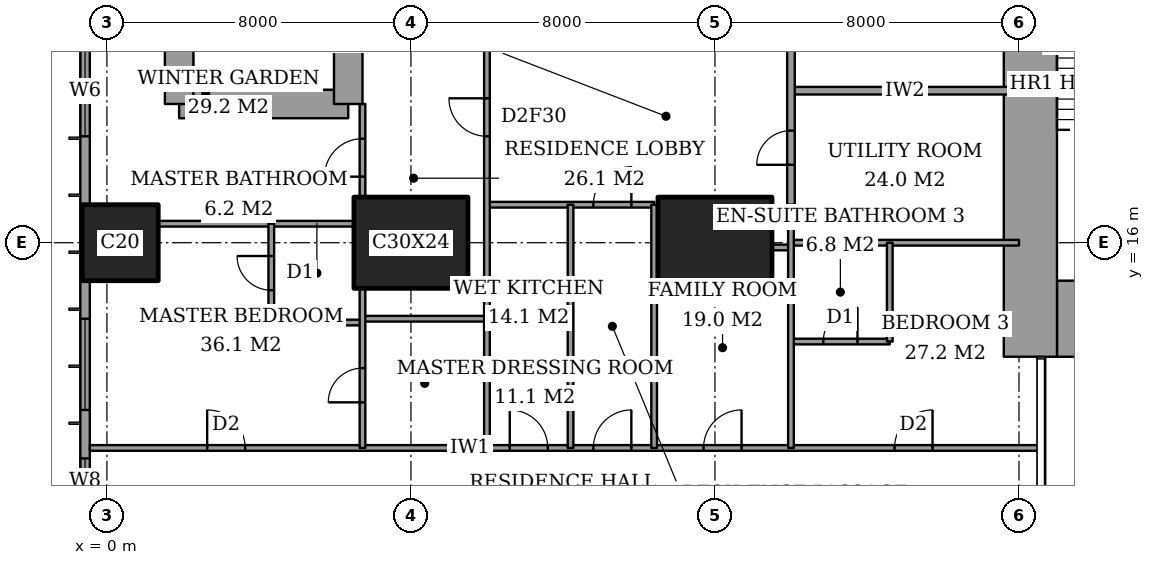
"""IFC4 building model, lengths in metres.
Left out: names, types, materials, properties, quantities, classifications, styles, units other than length and angle.
Written with IfcOpenShell. Run it as: python <this file> out.ifc"""

import sys

from ifc_helpers import new_model, si_unit, direction, frame, frame_2d, origin, origin_2d, place, context, subcontext, project, spatial, rectangle, extrude, element, fill, save


model = new_model("IFC4")
c1 = context("Model", 3, precision=1e-05, world=origin(), true_north=direction((0.0, 1.0)))
c2 = subcontext(c1, "Body", "Model", "MODEL_VIEW")
j1 = project(units=[si_unit("LENGTHUNIT", "METRE"), si_unit("PLANEANGLEUNIT", "RADIAN")], contexts=[c1])
p1 = place(None, origin())
s1 = spatial("IfcSite", under=j1, at=p1, CompositionType="ELEMENT")
p2 = place(p1, origin())
s2 = spatial("IfcBuilding", under=s1, at=p2, CompositionType="ELEMENT")
p3 = place(p2, frame((0.0, 0.0, 54.8)))
s3 = spatial("IfcBuildingStorey", under=s2, at=p3, CompositionType="ELEMENT", Elevation=54.8)
p4 = place(p3, frame((0.35, 16.0, 0.0), z_axis=(0.0, 0.0, 1.0), x_axis=(1.0, 0.0, 0.0)))
e1 = element("IfcColumn", 1, at=p4, inside=s3, PredefinedType="COLUMN", context=c2, shape_type="SweptSolid", body=[
    extrude(rectangle(XDim=2.0, YDim=2.0, at=origin_2d()), origin(), (0.0, 0.0, 1.0), 3.6),
])
for number, where, z_axis, x_axis in (
    (2, (8.0, 16.0, 0.0), (0.0, 0.0, 1.0), (1.0, 0.0, 0.0)),
    (3, (16.0, 16.0, 0.0), (0.0, 0.0, 1.0), (1.0, 0.0, 0.0)),
):
    element("IfcColumn", number, at=place(p3, frame(where, z_axis=z_axis, x_axis=x_axis)), inside=s3, PredefinedType="COLUMN", context=c2, shape_type="SweptSolid", body=[
        extrude(rectangle(XDim=3.0, YDim=2.4, at=origin_2d()), origin(), (0.0, 0.0, 1.0), 3.6),
    ])
p5 = place(p3, frame((25.0, 14.0, 0.0), z_axis=(0.0, 0.0, 1.0), x_axis=(1.0, 0.0, 0.0)))
e4 = element("IfcWall", 4, at=p5, inside=s3, PredefinedType="SHEAR", context=c2, shape_type="SweptSolid", body=[
    extrude(rectangle(XDim=3.15, YDim=2.0, at=frame_2d((1.575, 0.0))), origin(), (0.0, 0.0, 1.0), 3.6),
])
p6 = place(p3, frame((24.3, 13.0, 0.0), z_axis=(0.0, 0.0, 1.0), x_axis=(0.0, 1.0, 0.0)))
e5 = element("IfcWall", 5, at=p6, inside=s3, PredefinedType="SHEAR", context=c2, shape_type="SweptSolid", body=[
    extrude(rectangle(XDim=10.15, YDim=1.4, at=frame_2d((5.075, 0.0))), origin(), (0.0, 0.0, 1.0), 3.6),
])
p7 = place(p3, frame((1.9, 19.65, 0.0), z_axis=(0.0, 0.0, 1.0), x_axis=(1.0, 0.0, 0.0)))
e6 = element("IfcWall", 6, at=p7, inside=s3, PredefinedType="SHEAR", context=c2, shape_type="SweptSolid", body=[
    extrude(rectangle(XDim=4.45, YDim=0.75, at=frame_2d((2.225, 0.0))), origin(), (0.0, 0.0, 1.0), 3.6),
])
p8 = place(p3, frame((6.35, 19.65, 0.0), z_axis=(0.0, 0.0, 1.0), x_axis=(0.0, 1.0, 0.0)))
e7 = element("IfcWall", 7, at=p8, inside=s3, PredefinedType="SHEAR", context=c2, shape_type="SweptSolid", body=[
    extrude(rectangle(XDim=8.7, YDim=0.75, at=frame_2d((4.35, 0.0))), origin(), (0.0, 0.0, 1.0), 3.6),
])
p9 = place(p8, frame((6.725, 0.0, 0.0)))
e8 = element("IfcOpeningElement", 8, at=p9, cuts=e7, PredefinedType="OPENING", context=c2, shape_type="SweptSolid", body=[
    extrude(rectangle(XDim=1.0, YDim=2.1, at=frame_2d((0.5, 1.05))), frame((0.0, 0.385, 0.0), z_axis=(0.0, -1.0, 0.0), x_axis=(1.0, 0.0, 0.0)), (0.0, 0.0, 1.0), 0.77),
])
p10 = place(p3, frame((1.9, 28.35, 0.0), z_axis=(0.0, 0.0, 1.0), x_axis=(0.0, -1.0, 0.0)))
e9 = element("IfcWall", 9, at=p10, inside=s3, PredefinedType="SHEAR", context=c2, shape_type="SweptSolid", body=[
    extrude(rectangle(XDim=8.7, YDim=0.75, at=frame_2d((4.35, 0.0))), origin(), (0.0, 0.0, 1.0), 3.6),
])
p11 = place(p3, frame((-0.575, 44.825, 0.0), z_axis=(0.0, 0.0, 1.0), x_axis=(0.0, -1.0, 0.0)))
e10 = element("IfcWall", 10, at=p11, inside=s3, PredefinedType="SOLIDWALL", context=c2, shape_type="SweptSolid", body=[
    extrude(rectangle(XDim=41.65, YDim=0.25, at=frame_2d((20.825, 0.0))), origin(), (0.0, 0.0, 1.0), 3.6),
])
p12 = place(p11, frame((0.775, 0.0, 0.6)))
e11 = element("IfcOpeningElement", 11, at=p12, cuts=e10, PredefinedType="OPENING", context=c2, shape_type="SweptSolid", body=[
    extrude(rectangle(XDim=2.4, YDim=2.0, at=frame_2d((1.2, 1.0))), frame((0.0, 0.135, 0.0), z_axis=(0.0, -1.0, 0.0), x_axis=(1.0, 0.0, 0.0)), (0.0, 0.0, 1.0), 0.27),
])
p13 = place(p11, frame((6.1, 0.0, 0.6)))
e12 = element("IfcOpeningElement", 12, at=p13, cuts=e10, PredefinedType="OPENING", context=c2, shape_type="SweptSolid", body=[
    extrude(rectangle(XDim=1.2, YDim=2.0, at=frame_2d((0.6, 1.0))), frame((0.0, 0.135, 0.0), z_axis=(0.0, -1.0, 0.0), x_axis=(1.0, 0.0, 0.0)), (0.0, 0.0, 1.0), 0.27),
])
p14 = place(p11, frame((8.425, 0.0, 0.6)))
e13 = element("IfcOpeningElement", 13, at=p14, cuts=e10, PredefinedType="OPENING", context=c2, shape_type="SweptSolid", body=[
    extrude(rectangle(XDim=2.4, YDim=2.0, at=frame_2d((1.2, 1.0))), frame((0.0, 0.135, 0.0), z_axis=(0.0, -1.0, 0.0), x_axis=(1.0, 0.0, 0.0)), (0.0, 0.0, 1.0), 0.27),
])
p15 = place(p11, frame((15.625, 0.0, 0.6)))
e14 = element("IfcOpeningElement", 14, at=p15, cuts=e10, PredefinedType="OPENING", context=c2, shape_type="SweptSolid", body=[
    extrude(rectangle(XDim=2.4, YDim=2.0, at=frame_2d((1.2, 1.0))), frame((0.0, 0.135, 0.0), z_axis=(0.0, -1.0, 0.0), x_axis=(1.0, 0.0, 0.0)), (0.0, 0.0, 1.0), 0.27),
])
p16 = place(p11, frame((23.625, 0.0, 0.6)))
e15 = element("IfcOpeningElement", 15, at=p16, cuts=e10, PredefinedType="OPENING", context=c2, shape_type="SweptSolid", body=[
    extrude(rectangle(XDim=2.4, YDim=2.0, at=frame_2d((1.2, 1.0))), frame((0.0, 0.135, 0.0), z_axis=(0.0, -1.0, 0.0), x_axis=(1.0, 0.0, 0.0)), (0.0, 0.0, 1.0), 0.27),
])
p17 = place(p11, frame((30.825, 0.0, 0.6)))
e16 = element("IfcOpeningElement", 16, at=p17, cuts=e10, PredefinedType="OPENING", context=c2, shape_type="SweptSolid", body=[
    extrude(rectangle(XDim=2.4, YDim=2.0, at=frame_2d((1.2, 1.0))), frame((0.0, 0.135, 0.0), z_axis=(0.0, -1.0, 0.0), x_axis=(1.0, 0.0, 0.0)), (0.0, 0.0, 1.0), 0.27),
])
p18 = place(p11, frame((34.5, 0.0, 0.6)))
e17 = element("IfcOpeningElement", 17, at=p18, cuts=e10, PredefinedType="OPENING", context=c2, shape_type="SweptSolid", body=[
    extrude(rectangle(XDim=1.2, YDim=2.0, at=frame_2d((0.6, 1.0))), frame((0.0, 0.135, 0.0), z_axis=(0.0, -1.0, 0.0), x_axis=(1.0, 0.0, 0.0)), (0.0, 0.0, 1.0), 0.27),
])
p19 = place(p11, frame((38.475, 0.0, 0.6)))
e18 = element("IfcOpeningElement", 18, at=p19, cuts=e10, PredefinedType="OPENING", context=c2, shape_type="SweptSolid", body=[
    extrude(rectangle(XDim=2.4, YDim=2.0, at=frame_2d((1.2, 1.0))), frame((0.0, 0.135, 0.0), z_axis=(0.0, -1.0, 0.0), x_axis=(1.0, 0.0, 0.0)), (0.0, 0.0, 1.0), 0.27),
])
p20 = place(p3, frame((-0.45, 10.6, 0.0), z_axis=(0.0, 0.0, 1.0), x_axis=(1.0, 0.0, 0.0)))
e19 = element("IfcWall", 19, at=p20, inside=s3, PredefinedType="PARTITIONING", context=c2, shape_type="SweptSolid", body=[
    extrude(rectangle(XDim=25.011, YDim=0.15, at=frame_2d((12.505, 0.0))), origin(), (0.0, 0.0, 1.0), 3.35),
])
p21 = place(p20, frame((13.25, 0.0, 0.0)))
e20 = element("IfcOpeningElement", 20, at=p21, cuts=e19, PredefinedType="OPENING", context=c2, shape_type="SweptSolid", body=[
    extrude(rectangle(XDim=1.0, YDim=2.1, at=frame_2d((0.5, 1.05))), frame((0.0, 0.085, 0.0), z_axis=(0.0, -1.0, 0.0), x_axis=(1.0, 0.0, 0.0)), (0.0, 0.0, 1.0), 0.17),
])
p22 = place(p20, frame((3.087, 0.0, 0.0)))
e21 = element("IfcOpeningElement", 21, at=p22, cuts=e19, PredefinedType="OPENING", context=c2, shape_type="SweptSolid", body=[
    extrude(rectangle(XDim=1.0, YDim=2.1, at=frame_2d((0.5, 1.05))), frame((0.0, 0.085, 0.0), z_axis=(0.0, -1.0, 0.0), x_axis=(1.0, 0.0, 0.0)), (0.0, 0.0, 1.0), 0.17),
])
p23 = place(p20, frame((11.05, 0.0, 0.0)))
e22 = element("IfcOpeningElement", 22, at=p23, cuts=e19, PredefinedType="OPENING", context=c2, shape_type="SweptSolid", body=[
    extrude(rectangle(XDim=1.0, YDim=2.1, at=frame_2d((0.5, 1.05))), frame((0.0, 0.085, 0.0), z_axis=(0.0, -1.0, 0.0), x_axis=(1.0, 0.0, 0.0)), (0.0, 0.0, 1.0), 0.17),
])
p24 = place(p20, frame((16.15, 0.0, 0.0)))
e23 = element("IfcOpeningElement", 23, at=p24, cuts=e19, PredefinedType="OPENING", context=c2, shape_type="SweptSolid", body=[
    extrude(rectangle(XDim=1.0, YDim=2.1, at=frame_2d((0.5, 1.05))), frame((0.0, 0.085, 0.0), z_axis=(0.0, -1.0, 0.0), x_axis=(1.0, 0.0, 0.0)), (0.0, 0.0, 1.0), 0.17),
])
p25 = place(p20, frame((21.175, 0.0, 0.0)))
e24 = element("IfcOpeningElement", 24, at=p25, cuts=e19, PredefinedType="OPENING", context=c2, shape_type="SweptSolid", body=[
    extrude(rectangle(XDim=1.0, YDim=2.1, at=frame_2d((0.5, 1.05))), frame((0.0, 0.085, 0.0), z_axis=(0.0, -1.0, 0.0), x_axis=(1.0, 0.0, 0.0)), (0.0, 0.0, 1.0), 0.17),
])
p26 = place(p3, frame((18.0, 13.4, 0.0), z_axis=(0.0, 0.0, 1.0), x_axis=(1.0, 0.0, 0.0)))
e25 = element("IfcWall", 25, at=p26, inside=s3, PredefinedType="PARTITIONING", context=c2, shape_type="SweptSolid", body=[
    extrude(rectangle(XDim=2.6, YDim=0.15, at=frame_2d((1.3, 0.0))), origin(), (0.0, 0.0, 1.0), 3.35),
])
p27 = place(p26, frame((0.85, 0.0, 0.0)))
e26 = element("IfcOpeningElement", 26, at=p27, cuts=e25, PredefinedType="OPENING", context=c2, shape_type="SweptSolid", body=[
    extrude(rectangle(XDim=0.9, YDim=2.1, at=frame_2d((0.45, 1.05))), frame((0.0, 0.085, 0.0), z_axis=(0.0, -1.0, 0.0), x_axis=(1.0, 0.0, 0.0)), (0.0, 0.0, 1.0), 0.17),
])
p28 = place(p3, frame((4.325, 13.9, 0.0), z_axis=(0.0, 0.0, 1.0), x_axis=(1.0, 0.0, 0.0)))
e27 = element("IfcWall", 27, at=p28, inside=s3, PredefinedType="PARTITIONING", context=c2, shape_type="SweptSolid", body=[
    extrude(rectangle(XDim=2.4, YDim=0.15, at=frame_2d((1.2, 0.0))), origin(), (0.0, 0.0, 1.0), 3.35),
])
p29 = place(p3, frame((6.725, 14.0, 0.0), z_axis=(0.0, 0.0, 1.0), x_axis=(1.0, 0.0, 0.0)))
e28 = element("IfcWall", 28, at=p29, inside=s3, PredefinedType="PARTITIONING", context=c2, shape_type="SweptSolid", body=[
    extrude(rectangle(XDim=3.275, YDim=0.15, at=frame_2d((1.637, 0.0))), origin(), (0.0, 0.0, 1.0), 3.35),
])
p30 = place(p3, frame((17.5, 15.875, 0.0), z_axis=(0.0, 0.0, 1.0), x_axis=(1.0, 0.0, 0.0)))
e29 = element("IfcWall", 29, at=p30, inside=s3, PredefinedType="PARTITIONING", context=c2, shape_type="SweptSolid", body=[
    extrude(rectangle(XDim=0.5, YDim=0.15, at=frame_2d((0.25, 0.0))), origin(), (0.0, 0.0, 1.0), 2.634),
])
p31 = place(p3, frame((18.0, 16.0, 0.0), z_axis=(0.0, 0.0, 1.0), x_axis=(1.0, 0.0, 0.0)))
e30 = element("IfcWall", 30, at=p31, inside=s3, PredefinedType="PARTITIONING", context=c2, shape_type="SweptSolid", body=[
    extrude(rectangle(XDim=6.0, YDim=0.15, at=frame_2d((3.0, 0.0))), origin(), (0.0, 0.0, 1.0), 2.634),
])
p32 = place(p3, frame((1.35, 16.5, 0.0), z_axis=(0.0, 0.0, 1.0), x_axis=(1.0, 0.0, 0.0)))
e31 = element("IfcWall", 31, at=p32, inside=s3, PredefinedType="PARTITIONING", context=c2, shape_type="SweptSolid", body=[
    extrude(rectangle(XDim=5.15, YDim=0.15, at=frame_2d((2.575, 0.0))), origin(), (0.0, 0.0, 1.0), 3.35),
])
p33 = place(p3, frame((10.0, 17.0, 0.0), z_axis=(0.0, 0.0, 1.0), x_axis=(1.0, 0.0, 0.0)))
e32 = element("IfcWall", 32, at=p33, inside=s3, PredefinedType="PARTITIONING", context=c2, shape_type="SweptSolid", body=[
    extrude(rectangle(XDim=4.4, YDim=0.15, at=frame_2d((2.2, 0.0))), origin(), (0.0, 0.0, 1.0), 3.35),
])
p34 = place(p33, frame((2.8, 0.0, 0.0)))
e33 = element("IfcOpeningElement", 33, at=p34, cuts=e32, PredefinedType="OPENING", context=c2, shape_type="SweptSolid", body=[
    extrude(rectangle(XDim=1.0, YDim=2.1, at=frame_2d((0.5, 1.05))), frame((0.0, 0.085, 0.0), z_axis=(0.0, -1.0, 0.0), x_axis=(1.0, 0.0, 0.0)), (0.0, 0.0, 1.0), 0.17),
])
p35 = place(p3, frame((18.0, 20.0, 0.0), z_axis=(0.0, 0.0, 1.0), x_axis=(1.0, 0.0, 0.0)))
e34 = element("IfcWall", 34, at=p35, inside=s3, PredefinedType="PARTITIONING", context=c2, shape_type="SweptSolid", body=[
    extrude(rectangle(XDim=6.0, YDim=0.2, at=frame_2d((3.0, 0.0))), origin(), (0.0, 0.0, 1.0), 3.35),
])
p36 = place(p3, frame((4.325, 13.9, 0.0), z_axis=(0.0, 0.0, 1.0), x_axis=(0.0, 1.0, 0.0)))
e35 = element("IfcWall", 35, at=p36, inside=s3, PredefinedType="PARTITIONING", context=c2, shape_type="SweptSolid", body=[
    extrude(rectangle(XDim=2.6, YDim=0.15, at=frame_2d((1.3, 0.0))), origin(), (0.0, 0.0, 1.0), 3.35),
])
p37 = place(p36, frame((0.85, 0.0, 0.0)))
e36 = element("IfcOpeningElement", 36, at=p37, cuts=e35, PredefinedType="OPENING", context=c2, shape_type="SweptSolid", body=[
    extrude(rectangle(XDim=0.9, YDim=2.1, at=frame_2d((0.45, 1.05))), frame((0.0, 0.085, 0.0), z_axis=(0.0, -1.0, 0.0), x_axis=(1.0, 0.0, 0.0)), (0.0, 0.0, 1.0), 0.17),
])
p38 = place(p3, frame((6.725, 10.6, 0.0), z_axis=(0.0, 0.0, 1.0), x_axis=(0.0, 1.0, 0.0)))
e37 = element("IfcWall", 37, at=p38, inside=s3, PredefinedType="PARTITIONING", context=c2, shape_type="SweptSolid", body=[
    extrude(rectangle(XDim=4.2, YDim=0.15, at=frame_2d((2.1, 0.0))), origin(), (0.0, 0.0, 1.0), 3.35),
])
p39 = place(p38, frame((1.2, 0.0, 0.0)))
e38 = element("IfcOpeningElement", 38, at=p39, cuts=e37, PredefinedType="OPENING", context=c2, shape_type="SweptSolid", body=[
    extrude(rectangle(XDim=0.9, YDim=2.1, at=frame_2d((0.45, 1.05))), frame((0.0, 0.085, 0.0), z_axis=(0.0, -1.0, 0.0), x_axis=(1.0, 0.0, 0.0)), (0.0, 0.0, 1.0), 0.17),
])
p40 = place(p3, frame((6.725, 17.2, 0.0), z_axis=(0.0, 0.0, 1.0), x_axis=(0.0, 1.0, 0.0)))
e39 = element("IfcWall", 39, at=p40, inside=s3, PredefinedType="PARTITIONING", context=c2, shape_type="SweptSolid", body=[
    extrude(rectangle(XDim=2.45, YDim=0.15, at=frame_2d((1.225, 0.0))), origin(), (0.0, 0.0, 1.0), 3.35),
])
p41 = place(p40, frame((0.538, 0.0, 0.0)))
e40 = element("IfcOpeningElement", 40, at=p41, cuts=e39, PredefinedType="OPENING", context=c2, shape_type="SweptSolid", body=[
    extrude(rectangle(XDim=1.0, YDim=2.1, at=frame_2d((0.5, 1.05))), frame((0.0, 0.085, 0.0), z_axis=(0.0, -1.0, 0.0), x_axis=(1.0, 0.0, 0.0)), (0.0, 0.0, 1.0), 0.17),
])
p42 = place(p3, frame((10.0, 10.6, 0.0), z_axis=(0.0, 0.0, 1.0), x_axis=(0.0, 1.0, 0.0)))
e41 = element("IfcWall", 41, at=p42, inside=s3, PredefinedType="PARTITIONING", context=c2, shape_type="SweptSolid", body=[
    extrude(rectangle(XDim=11.0, YDim=0.15, at=frame_2d((5.5, 0.0))), origin(), (0.0, 0.0, 1.0), 3.35),
])
p43 = place(p42, frame((8.2, 0.0, 0.0)))
e42 = element("IfcOpeningElement", 42, at=p43, cuts=e41, PredefinedType="OPENING", context=c2, shape_type="SweptSolid", body=[
    extrude(rectangle(XDim=1.0, YDim=2.1, at=frame_2d((0.5, 1.05))), frame((0.0, 0.085, 0.0), z_axis=(0.0, -1.0, 0.0), x_axis=(1.0, 0.0, 0.0)), (0.0, 0.0, 1.0), 0.17),
])
for number, where, z_axis, x_axis in (
    (43, (12.2, 10.6, 0.0), (0.0, 0.0, 1.0), (0.0, 1.0, 0.0)),
    (44, (14.4, 10.6, 0.0), (0.0, 0.0, 1.0), (0.0, 1.0, 0.0)),
):
    element("IfcWall", number, at=place(p3, frame(where, z_axis=z_axis, x_axis=x_axis)), inside=s3, PredefinedType="PARTITIONING", context=c2, shape_type="SweptSolid", body=[
        extrude(rectangle(XDim=6.4, YDim=0.15, at=frame_2d((3.2, 0.0))), origin(), (0.0, 0.0, 1.0), 3.35),
    ])
p44 = place(p3, frame((18.0, 17.0, 0.0), z_axis=(0.0, 0.0, 1.0), x_axis=(0.0, 1.0, 0.0)))
e45 = element("IfcWall", 45, at=p44, inside=s3, PredefinedType="PARTITIONING", context=c2, shape_type="SweptSolid", body=[
    extrude(rectangle(XDim=7.0, YDim=0.2, at=frame_2d((3.5, 0.0))), origin(), (0.0, 0.0, 1.0), 3.35),
])
p45 = place(p44, frame((4.4, 0.0, 0.0)))
e46 = element("IfcOpeningElement", 46, at=p45, cuts=e45, PredefinedType="OPENING", context=c2, shape_type="SweptSolid", body=[
    extrude(rectangle(XDim=1.2, YDim=2.4, at=frame_2d((0.6, 1.2))), frame((0.0, 0.11, 0.0), z_axis=(0.0, -1.0, 0.0), x_axis=(1.0, 0.0, 0.0)), (0.0, 0.0, 1.0), 0.22),
])
p46 = place(p44, frame((1.05, 0.0, 0.0)))
e47 = element("IfcOpeningElement", 47, at=p46, cuts=e45, PredefinedType="OPENING", context=c2, shape_type="SweptSolid", body=[
    extrude(rectangle(XDim=0.9, YDim=2.1, at=frame_2d((0.45, 1.05))), frame((0.0, 0.11, 0.0), z_axis=(0.0, -1.0, 0.0), x_axis=(1.0, 0.0, 0.0)), (0.0, 0.0, 1.0), 0.22),
])
p47 = place(p3, frame((18.0, 10.6, 0.0), z_axis=(0.0, 0.0, 1.0), x_axis=(0.0, 1.0, 0.0)))
e48 = element("IfcWall", 48, at=p47, inside=s3, PredefinedType="PARTITIONING", context=c2, shape_type="SweptSolid", body=[
    extrude(rectangle(XDim=6.4, YDim=0.15, at=frame_2d((3.2, 0.0))), origin(), (0.0, 0.0, 1.0), 3.35),
])
p48 = place(p3, frame((20.6, 13.4, 0.0), z_axis=(0.0, 0.0, 1.0), x_axis=(0.0, 1.0, 0.0)))
e49 = element("IfcWall", 49, at=p48, inside=s3, PredefinedType="PARTITIONING", context=c2, shape_type="SweptSolid", body=[
    extrude(rectangle(XDim=2.6, YDim=0.15, at=frame_2d((1.3, 0.0))), origin(), (0.0, 0.0, 1.0), 3.35),
])
p49 = place(p16, origin())
e50 = element("IfcWindow", 50, at=p49, inside=s3, PartitioningType="SINGLE_PANEL", PredefinedType="WINDOW", context=c2, shape_type="SweptSolid", body=[
    extrude(rectangle(XDim=2.4, YDim=2.0, at=frame_2d((1.2, 1.0))), frame((0.0, 0.03, 0.0), z_axis=(0.0, -1.0, 0.0), x_axis=(1.0, 0.0, 0.0)), (0.0, 0.0, 1.0), 0.06),
])
fill(e15, e50)
p50 = place(p17, origin())
e51 = element("IfcWindow", 51, at=p50, inside=s3, PartitioningType="SINGLE_PANEL", PredefinedType="WINDOW", context=c2, shape_type="SweptSolid", body=[
    extrude(rectangle(XDim=2.4, YDim=2.0, at=frame_2d((1.2, 1.0))), frame((0.0, 0.03, 0.0), z_axis=(0.0, -1.0, 0.0), x_axis=(1.0, 0.0, 0.0)), (0.0, 0.0, 1.0), 0.06),
])
fill(e16, e51)
p51 = place(p18, origin())
e52 = element("IfcWindow", 52, at=p51, inside=s3, PartitioningType="SINGLE_PANEL", PredefinedType="WINDOW", context=c2, shape_type="SweptSolid", body=[
    extrude(rectangle(XDim=1.2, YDim=2.0, at=frame_2d((0.6, 1.0))), frame((0.0, 0.03, 0.0), z_axis=(0.0, -1.0, 0.0), x_axis=(1.0, 0.0, 0.0)), (0.0, 0.0, 1.0), 0.06),
])
fill(e17, e52)
p52 = place(p21, origin())
e53 = element("IfcDoor", 53, at=p52, inside=s3, OperationType="SINGLE_SWING_LEFT", PredefinedType="DOOR", context=c2, shape_type="SweptSolid", body=[
    extrude(rectangle(XDim=1.0, YDim=2.1, at=frame_2d((0.5, 1.05))), frame((0.0, 0.025, 0.0), z_axis=(0.0, -1.0, 0.0), x_axis=(1.0, 0.0, 0.0)), (0.0, 0.0, 1.0), 0.05),
])
fill(e20, e53)
p53 = place(p37, origin())
e54 = element("IfcDoor", 54, at=p53, inside=s3, OperationType="SINGLE_SWING_LEFT", PredefinedType="DOOR", context=c2, shape_type="SweptSolid", body=[
    extrude(rectangle(XDim=0.9, YDim=2.1, at=frame_2d((0.45, 1.05))), frame((0.0, 0.025, 0.0), z_axis=(0.0, -1.0, 0.0), x_axis=(1.0, 0.0, 0.0)), (0.0, 0.0, 1.0), 0.05),
])
fill(e36, e54)
p54 = place(p22, origin())
e55 = element("IfcDoor", 55, at=p54, inside=s3, OperationType="SINGLE_SWING_RIGHT", PredefinedType="DOOR", context=c2, shape_type="SweptSolid", body=[
    extrude(rectangle(XDim=1.0, YDim=2.1, at=frame_2d((0.5, 1.05))), frame((0.0, 0.025, 0.0), z_axis=(0.0, -1.0, 0.0), x_axis=(1.0, 0.0, 0.0)), (0.0, 0.0, 1.0), 0.05),
])
fill(e21, e55)
p55 = place(p41, origin())
e56 = element("IfcDoor", 56, at=p55, inside=s3, OperationType="SINGLE_SWING_RIGHT", PredefinedType="DOOR", context=c2, shape_type="SweptSolid", body=[
    extrude(rectangle(XDim=1.0, YDim=2.1, at=frame_2d((0.5, 1.05))), frame((0.0, 0.025, 0.0), z_axis=(0.0, -1.0, 0.0), x_axis=(1.0, 0.0, 0.0)), (0.0, 0.0, 1.0), 0.05),
])
fill(e40, e56)
p56 = place(p39, origin())
e57 = element("IfcDoor", 57, at=p56, inside=s3, OperationType="SINGLE_SWING_RIGHT", PredefinedType="DOOR", context=c2, shape_type="SweptSolid", body=[
    extrude(rectangle(XDim=0.9, YDim=2.1, at=frame_2d((0.45, 1.05))), frame((0.0, 0.025, 0.0), z_axis=(0.0, -1.0, 0.0), x_axis=(1.0, 0.0, 0.0)), (0.0, 0.0, 1.0), 0.05),
])
fill(e38, e57)
p57 = place(p43, origin())
e58 = element("IfcDoor", 58, at=p57, inside=s3, OperationType="SINGLE_SWING_LEFT", PredefinedType="DOOR", context=c2, shape_type="SweptSolid", body=[
    extrude(rectangle(XDim=1.0, YDim=2.1, at=frame_2d((0.5, 1.05))), frame((0.0, 0.025, 0.0), z_axis=(0.0, -1.0, 0.0), x_axis=(1.0, 0.0, 0.0)), (0.0, 0.0, 1.0), 0.05),
])
fill(e42, e58)
p58 = place(p23, origin())
e59 = element("IfcDoor", 59, at=p58, inside=s3, OperationType="SINGLE_SWING_RIGHT", PredefinedType="DOOR", context=c2, shape_type="SweptSolid", body=[
    extrude(rectangle(XDim=1.0, YDim=2.1, at=frame_2d((0.5, 1.05))), frame((0.0, 0.025, 0.0), z_axis=(0.0, -1.0, 0.0), x_axis=(1.0, 0.0, 0.0)), (0.0, 0.0, 1.0), 0.05),
])
fill(e22, e59)
p59 = place(p34, origin())
e60 = element("IfcDoor", 60, at=p59, inside=s3, OperationType="SINGLE_SWING_LEFT", PredefinedType="DOOR", context=c2, shape_type="SweptSolid", body=[
    extrude(rectangle(XDim=1.0, YDim=2.1, at=frame_2d((0.5, 1.05))), frame((0.0, 0.025, 0.0), z_axis=(0.0, -1.0, 0.0), x_axis=(1.0, 0.0, 0.0)), (0.0, 0.0, 1.0), 0.05),
])
fill(e33, e60)
p60 = place(p24, origin())
e61 = element("IfcDoor", 61, at=p60, inside=s3, OperationType="SINGLE_SWING_LEFT", PredefinedType="DOOR", context=c2, shape_type="SweptSolid", body=[
    extrude(rectangle(XDim=1.0, YDim=2.1, at=frame_2d((0.5, 1.05))), frame((0.0, 0.025, 0.0), z_axis=(0.0, -1.0, 0.0), x_axis=(1.0, 0.0, 0.0)), (0.0, 0.0, 1.0), 0.05),
])
fill(e23, e61)
p61 = place(p27, origin())
e62 = element("IfcDoor", 62, at=p61, inside=s3, OperationType="SINGLE_SWING_LEFT", PredefinedType="DOOR", context=c2, shape_type="SweptSolid", body=[
    extrude(rectangle(XDim=0.9, YDim=2.1, at=frame_2d((0.45, 1.05))), frame((0.0, 0.025, 0.0), z_axis=(0.0, -1.0, 0.0), x_axis=(1.0, 0.0, 0.0)), (0.0, 0.0, 1.0), 0.05),
])
fill(e26, e62)
p62 = place(p25, origin())
e63 = element("IfcDoor", 63, at=p62, inside=s3, OperationType="SINGLE_SWING_LEFT", PredefinedType="DOOR", context=c2, shape_type="SweptSolid", body=[
    extrude(rectangle(XDim=1.0, YDim=2.1, at=frame_2d((0.5, 1.05))), frame((0.0, 0.025, 0.0), z_axis=(0.0, -1.0, 0.0), x_axis=(1.0, 0.0, 0.0)), (0.0, 0.0, 1.0), 0.05),
])
fill(e24, e63)
p63 = place(p46, origin())
e64 = element("IfcDoor", 64, at=p63, inside=s3, OperationType="SINGLE_SWING_RIGHT", PredefinedType="DOOR", context=c2, shape_type="SweptSolid", body=[
    extrude(rectangle(XDim=0.9, YDim=2.1, at=frame_2d((0.45, 1.05))), frame((0.0, 0.025, 0.0), z_axis=(0.0, -1.0, 0.0), x_axis=(1.0, 0.0, 0.0)), (0.0, 0.0, 1.0), 0.05),
])
fill(e47, e64)
save(model, sys.argv[1])
